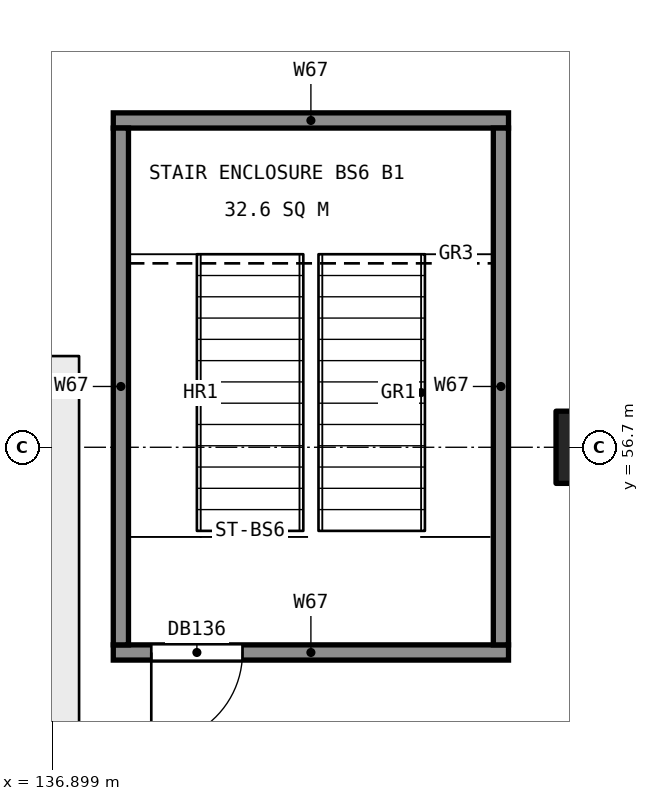
"""IFC4 building model, lengths in metres.
Left out: names, types, materials, properties, quantities, classifications, styles, units other than length and angle.
Written with IfcOpenShell. Run it as: python <this file> out.ifc"""

import sys

from ifc_helpers import new_model, si_unit, direction, frame, frame_2d, origin, origin_2d, place, context, subcontext, project, spatial, rectangle, extrude, element, fill, save


model = new_model("IFC4")
c1 = context("Model", 3, precision=1e-05, world=origin(), true_north=direction((0.0, 1.0)))
c2 = subcontext(c1, "Body", "Model", "MODEL_VIEW")
j1 = project(units=[si_unit("LENGTHUNIT", "METRE"), si_unit("PLANEANGLEUNIT", "RADIAN")], contexts=[c1])
p1 = place(None, origin())
s1 = spatial("IfcSite", under=j1, at=p1, CompositionType="ELEMENT")
p2 = place(p1, origin())
s2 = spatial("IfcBuilding", under=s1, at=p2, CompositionType="ELEMENT")
p3 = place(p2, frame((0.0, 0.0, -4.8)))
s3 = spatial("IfcBuildingStorey", under=s2, at=p3, CompositionType="ELEMENT", Elevation=-4.8)
p4 = place(p3, frame((144.0, 56.7, 0.0), z_axis=(0.0, 0.0, 1.0), x_axis=(1.0, 0.0, 0.0)))
e1 = element("IfcColumn", 1, at=p4, inside=s3, PredefinedType="COLUMN", context=c2, shape_type="SweptSolid", body=[
    extrude(rectangle(XDim=0.95, YDim=0.95, at=origin_2d()), origin(), (0.0, 0.0, 1.0), 4.35),
])
p5 = place(p3, frame((137.7, 54.0, 0.0), z_axis=(0.0, 0.0, 1.0), x_axis=(1.0, 0.0, 0.0)))
e2 = element("IfcWall", 2, at=p5, inside=s3, PredefinedType="SOLIDWALL", context=c2, shape_type="SweptSolid", body=[
    extrude(rectangle(XDim=5.2, YDim=0.2, at=frame_2d((2.6, 0.0))), origin(), (0.0, 0.0, 1.0), 4.35),
])
p6 = place(p5, frame((0.5, 0.0, 0.0)))
e3 = element("IfcOpeningElement", 3, at=p6, cuts=e2, PredefinedType="OPENING", context=c2, shape_type="SweptSolid", body=[
    extrude(rectangle(XDim=1.2, YDim=2.1, at=frame_2d((0.6, 1.05))), frame((0.0, 0.11, 0.0), z_axis=(0.0, -1.0, 0.0), x_axis=(1.0, 0.0, 0.0)), (0.0, 0.0, 1.0), 0.22),
])
p7 = place(p3, frame((137.7, 61.0, 0.0), z_axis=(0.0, 0.0, 1.0), x_axis=(1.0, 0.0, 0.0)))
e4 = element("IfcWall", 4, at=p7, inside=s3, PredefinedType="SOLIDWALL", context=c2, shape_type="SweptSolid", body=[
    extrude(rectangle(XDim=5.2, YDim=0.2, at=frame_2d((2.6, 0.0))), origin(), (0.0, 0.0, 1.0), 4.35),
])
for number, where, z_axis, x_axis in (
    (5, (137.8, 54.1, 0.0), (0.0, 0.0, 1.0), (0.0, 1.0, 0.0)),
    (6, (142.8, 54.1, 0.0), (0.0, 0.0, 1.0), (0.0, 1.0, 0.0)),
):
    element("IfcWall", number, at=place(p3, frame(where, z_axis=z_axis, x_axis=x_axis)), inside=s3, PredefinedType="SOLIDWALL", context=c2, shape_type="SweptSolid", body=[
        extrude(rectangle(XDim=6.8, YDim=0.2, at=frame_2d((3.4, 0.0))), origin(), (0.0, 0.0, 1.0), 4.35),
    ])
p8 = place(p6, frame((1.2, 0.0, 0.0), z_axis=(0.0, 0.0, 1.0), x_axis=(-1.0, 0.0, 0.0)))
e7 = element("IfcDoor", 7, at=p8, inside=s3, OperationType="SINGLE_SWING_RIGHT", PredefinedType="DOOR", context=c2, shape_type="SweptSolid", body=[
    extrude(rectangle(XDim=1.2, YDim=2.1, at=frame_2d((0.6, 1.05))), frame((0.0, 0.025, 0.0), z_axis=(0.0, -1.0, 0.0), x_axis=(1.0, 0.0, 0.0)), (0.0, 0.0, 1.0), 0.05),
])
fill(e3, e7)
save(model, sys.argv[1])
